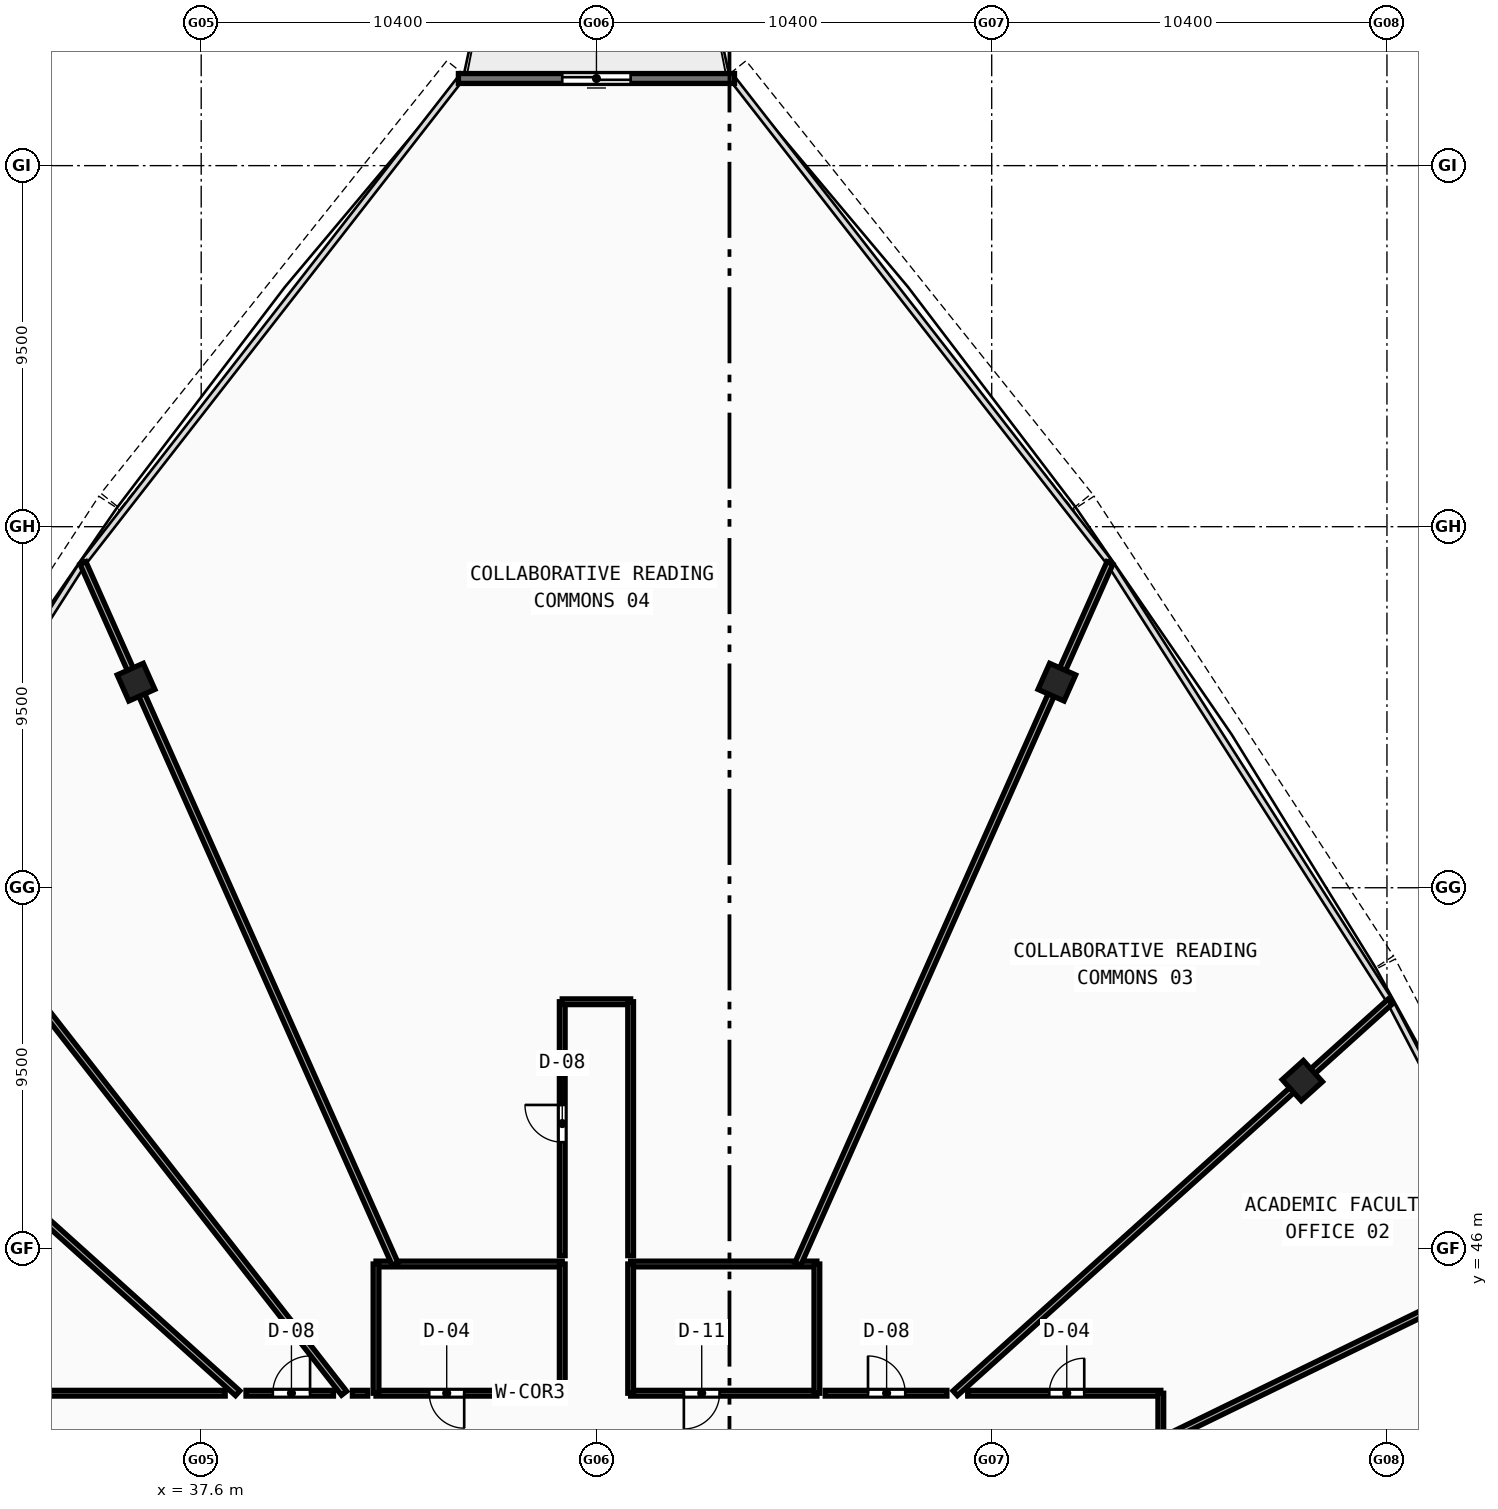
"""IFC4 building model, lengths in metres.
Left out: names, types, materials, properties, quantities, classifications, styles, units other than length and angle.
Written with IfcOpenShell. Run it as: python <this file> out.ifc"""

import sys

from ifc_helpers import new_model, si_unit, direction, frame, frame_2d, origin, origin_with_axes, origin_2d, place, context, subcontext, project, spatial, rectangle, hollow_rectangle, extrude, source, transform, mapped, element, fill, save


model = new_model("IFC4")
c1 = context("Model", 3, precision=1e-05, world=origin(), true_north=direction((0.0, 1.0)))
c2 = subcontext(c1, "Body", "Model", "MODEL_VIEW")
j1 = project(units=[si_unit("LENGTHUNIT", "METRE"), si_unit("PLANEANGLEUNIT", "RADIAN")], contexts=[c1])
p1 = place(None, origin())
s1 = spatial("IfcSite", under=j1, at=p1, CompositionType="ELEMENT")
p2 = place(p1, origin())
s2 = spatial("IfcBuilding", under=s1, at=p2, CompositionType="ELEMENT")
p3 = place(p2, frame((0.0, 0.0, 277.56)))
s3 = spatial("IfcBuildingStorey", under=s2, at=p3, CompositionType="ELEMENT", Elevation=277.56)
m1 = source(origin(), c2, "Body", "SweptSolid", [
    extrude(hollow_rectangle(XDim=0.75, YDim=0.75, WallThickness=0.028, at=origin_2d()), origin(), (0.0, 0.0, 1.0), 3.73),
])
for number, where, z_axis, x_axis in (
    (1, (66.573, 50.424, -0.26), (0.0, 0.0, 1.0), (-0.669, 0.743, 0.0)),
    (2, (60.114, 60.909, -0.26), (0.0, 0.0, 1.0), (-0.914, 0.407, 0.0)),
    (3, (35.886, 60.909, -0.26), (0.0, 0.0, 1.0), (-0.914, -0.407, 0.0)),
):
    element("IfcColumn", number, at=place(p3, frame(where, z_axis=z_axis, x_axis=x_axis)), inside=s3, PredefinedType="COLUMN", context=c2, shape_type="MappedRepresentation", body=[
        mapped(m1, transform((0.0, 0.0, 0.0), scale=1.0)),
    ])
p4 = place(p3, frame((51.632, 76.793, 0.0), z_axis=(0.0, 0.0, 1.0), x_axis=(-1.0, 0.0, 0.0)))
e4 = element("IfcWall", 4, at=p4, inside=s3, PredefinedType="STANDARD", context=c2, shape_type="SweptSolid", body=[
    extrude(rectangle(XDim=7.264, YDim=0.26, at=frame_2d((3.632, 0.0))), origin(), (0.0, 0.0, 1.0), 3.47),
])
p5 = place(p4, frame((2.732, 0.0, 0.0)))
e5 = element("IfcOpeningElement", 5, at=p5, cuts=e4, PredefinedType="OPENING", context=c2, shape_type="SweptSolid", body=[
    extrude(rectangle(XDim=1.8, YDim=2.15, at=frame_2d((0.9, 1.075))), frame((0.0, 0.14, 0.0), z_axis=(0.0, -1.0, 0.0), x_axis=(1.0, 0.0, 0.0)), (0.0, 0.0, 1.0), 0.28),
])
p6 = place(p3, frame((42.2, 42.2, 0.0), z_axis=(0.0, 0.0, 1.0), x_axis=(1.0, 0.0, 0.0)))
e6 = element("IfcWall", 6, at=p6, inside=s3, PredefinedType="PARTITIONING", context=c2, shape_type="SweptSolid", body=[
    extrude(rectangle(XDim=4.9, YDim=0.15, at=frame_2d((2.45, 0.0))), origin(), (0.0, 0.0, 1.0), 2.87),
])
p7 = place(p6, frame((1.4, 0.0, 0.0)))
e7 = element("IfcOpeningElement", 7, at=p7, cuts=e6, PredefinedType="OPENING", context=c2, shape_type="SweptSolid", body=[
    extrude(rectangle(XDim=0.92, YDim=2.1, at=frame_2d((0.46, 1.05))), frame((0.0, 0.085, 0.0), z_axis=(0.0, -1.0, 0.0), x_axis=(1.0, 0.0, 0.0)), (0.0, 0.0, 1.0), 0.17),
])
p8 = place(p3, frame((42.2, 45.6, 0.0), z_axis=(0.0, 0.0, 1.0), x_axis=(1.0, 0.0, 0.0)))
e8 = element("IfcWall", 8, at=p8, inside=s3, PredefinedType="PARTITIONING", context=c2, shape_type="SweptSolid", body=[
    extrude(rectangle(XDim=4.9, YDim=0.15, at=frame_2d((2.45, 0.0))), origin(), (0.0, 0.0, 1.0), 2.87),
])
for number, where, z_axis, x_axis in (
    (9, (42.2, 42.2, 0.0), (0.0, 0.0, 1.0), (0.0, 1.0, 0.0)),
    (10, (47.1, 42.2, 0.0), (0.0, 0.0, 1.0), (0.0, 1.0, 0.0)),
):
    element("IfcWall", number, at=place(p3, frame(where, z_axis=z_axis, x_axis=x_axis)), inside=s3, PredefinedType="PARTITIONING", context=c2, shape_type="SweptSolid", body=[
        extrude(rectangle(XDim=3.4, YDim=0.15, at=frame_2d((1.7, 0.0))), origin(), (0.0, 0.0, 1.0), 3.47),
    ])
p9 = place(p3, frame((48.9, 42.2, 0.0), z_axis=(0.0, 0.0, 1.0), x_axis=(1.0, 0.0, 0.0)))
e11 = element("IfcWall", 11, at=p9, inside=s3, PredefinedType="PARTITIONING", context=c2, shape_type="SweptSolid", body=[
    extrude(rectangle(XDim=4.9, YDim=0.15, at=frame_2d((2.45, 0.0))), origin(), (0.0, 0.0, 1.0), 2.87),
])
p10 = place(p9, frame((1.4, 0.0, 0.0)))
e12 = element("IfcOpeningElement", 12, at=p10, cuts=e11, PredefinedType="OPENING", context=c2, shape_type="SweptSolid", body=[
    extrude(rectangle(XDim=0.94, YDim=2.1, at=frame_2d((0.47, 1.05))), frame((0.0, 0.085, 0.0), z_axis=(0.0, -1.0, 0.0), x_axis=(1.0, 0.0, 0.0)), (0.0, 0.0, 1.0), 0.17),
])
p11 = place(p3, frame((48.9, 45.6, 0.0), z_axis=(0.0, 0.0, 1.0), x_axis=(1.0, 0.0, 0.0)))
e13 = element("IfcWall", 13, at=p11, inside=s3, PredefinedType="PARTITIONING", context=c2, shape_type="SweptSolid", body=[
    extrude(rectangle(XDim=4.9, YDim=0.15, at=frame_2d((2.45, 0.0))), origin(), (0.0, 0.0, 1.0), 2.87),
])
for number, where, z_axis, x_axis in (
    (14, (48.9, 42.2, 0.0), (0.0, 0.0, 1.0), (0.0, 1.0, 0.0)),
    (15, (53.8, 42.2, 0.0), (0.0, 0.0, 1.0), (0.0, 1.0, 0.0)),
):
    element("IfcWall", number, at=place(p3, frame(where, z_axis=z_axis, x_axis=x_axis)), inside=s3, PredefinedType="PARTITIONING", context=c2, shape_type="SweptSolid", body=[
        extrude(rectangle(XDim=3.4, YDim=0.15, at=frame_2d((1.7, 0.0))), origin(), (0.0, 0.0, 1.0), 3.47),
    ])
p12 = place(p3, frame((62.85, 38.525, 0.0), z_axis=(0.0, 0.0, 1.0), x_axis=(0.951059664494, 0.309007305047, 0.0)))
e16 = element("IfcWall", 16, at=p12, inside=s3, PredefinedType="PARTITIONING", context=c2, shape_type="SweptSolid", body=[
    extrude(rectangle(XDim=11.985, YDim=0.17, at=frame_2d((5.992, 0.0))), origin(), (0.0, 0.0, 1.0), 2.87),
])
p13 = place(p3, frame((62.85, 40.943, 0.0), z_axis=(0.0, 0.0, 1.0), x_axis=(0.89879540995, 0.43836835088, 0.0)))
e17 = element("IfcWall", 17, at=p13, inside=s3, PredefinedType="PARTITIONING", context=c2, shape_type="SweptSolid", body=[
    extrude(rectangle(XDim=10.703, YDim=0.17, at=frame_2d((5.351, 0.0))), origin(), (0.0, 0.0, 1.0), 2.87),
])
p14 = place(p3, frame((57.44, 42.2, 0.0), z_axis=(0.0, 0.0, 1.0), x_axis=(0.743145118403, 0.669130281032, 0.0)))
e18 = element("IfcWall", 18, at=p14, inside=s3, PredefinedType="PARTITIONING", context=c2, shape_type="SweptSolid", body=[
    extrude(rectangle(XDim=15.397, YDim=0.17, at=frame_2d((7.699, 0.0))), origin(), (0.0, 0.0, 1.0), 2.87),
])
for number, where, z_axis, x_axis in (
    (19, (53.298, 45.6, 0.0), (0.0, 0.0, 1.0), (0.407, 0.914, 0.0)),
    (20, (42.702, 45.6, 0.0), (0.0, 0.0, 1.0), (-0.407, 0.914, 0.0)),
):
    element("IfcWall", number, at=place(p3, frame(where, z_axis=z_axis, x_axis=x_axis)), inside=s3, PredefinedType="PARTITIONING", context=c2, shape_type="SweptSolid", body=[
        extrude(rectangle(XDim=20.191, YDim=0.17, at=frame_2d((10.096, 0.0))), origin(), (0.0, 0.0, 1.0), 2.87),
    ])
p15 = place(p3, frame((41.359, 42.2, 0.0), z_axis=(0.0, 0.0, 1.0), x_axis=(-0.615658553978, 0.788013036005, 0.0)))
e21 = element("IfcWall", 21, at=p15, inside=s3, PredefinedType="PARTITIONING", context=c2, shape_type="SweptSolid", body=[
    extrude(rectangle(XDim=18.609, YDim=0.17, at=frame_2d((9.304, 0.0))), origin(), (0.0, 0.0, 1.0), 2.87),
])
p16 = place(p3, frame((38.56, 42.2, 0.0), z_axis=(0.0, 0.0, 1.0), x_axis=(-0.743145118403, 0.669130281032, 0.0)))
e22 = element("IfcWall", 22, at=p16, inside=s3, PredefinedType="PARTITIONING", context=c2, shape_type="SweptSolid", body=[
    extrude(rectangle(XDim=15.397, YDim=0.17, at=frame_2d((7.699, 0.0))), origin(), (0.0, 0.0, 1.0), 2.87),
])
p17 = place(p3, frame((33.15, 42.2, 0.0), z_axis=(0.0, 0.0, 1.0), x_axis=(1.0, 0.0, 0.0)))
e23 = element("IfcWall", 23, at=p17, inside=s3, PredefinedType="PARTITIONING", context=c2, shape_type="SweptSolid", body=[
    extrude(rectangle(XDim=5.081, YDim=0.15, at=frame_2d((2.541, 0.0))), origin(), (0.0, 0.0, 1.0), 3.12),
])
p18 = place(p3, frame((38.78, 42.2, 0.0), z_axis=(0.0, 0.0, 1.0), x_axis=(1.0, 0.0, 0.0)))
e24 = element("IfcWall", 24, at=p18, inside=s3, PredefinedType="PARTITIONING", context=c2, shape_type="SweptSolid", body=[
    extrude(rectangle(XDim=2.3, YDim=0.15, at=frame_2d((1.15, 0.0))), origin(), (0.0, 0.0, 1.0), 2.87),
])
p19 = place(p18, frame((0.705, 0.0, 0.0)))
e25 = element("IfcOpeningElement", 25, at=p19, cuts=e24, PredefinedType="OPENING", context=c2, shape_type="SweptSolid", body=[
    extrude(rectangle(XDim=0.98, YDim=2.12, at=frame_2d((0.49, 1.06))), frame((0.0, 0.085, 0.0), z_axis=(0.0, -1.0, 0.0), x_axis=(1.0, 0.0, 0.0)), (0.0, 0.0, 1.0), 0.17),
])
p20 = place(p3, frame((41.579, 42.2, 0.0), z_axis=(0.0, 0.0, 1.0), x_axis=(1.0, 0.0, 0.0)))
e26 = element("IfcWall", 26, at=p20, inside=s3, PredefinedType="PARTITIONING", context=c2, shape_type="SweptSolid", body=[
    extrude(rectangle(XDim=0.401, YDim=0.15, at=frame_2d((0.201, 0.0))), origin(), (0.0, 0.0, 1.0), 3.47),
])
p21 = place(p3, frame((47.1, 45.82, 0.0), z_axis=(0.0, 0.0, 1.0), x_axis=(0.0, 1.0, 0.0)))
e27 = element("IfcWall", 27, at=p21, inside=s3, PredefinedType="PARTITIONING", context=c2, shape_type="SweptSolid", body=[
    extrude(rectangle(XDim=6.68, YDim=0.15, at=frame_2d((3.34, 0.0))), origin(), (0.0, 0.0, 1.0), 3.12),
])
p22 = place(p21, frame((2.985, 0.0, 0.0)))
e28 = element("IfcOpeningElement", 28, at=p22, cuts=e27, PredefinedType="OPENING", context=c2, shape_type="SweptSolid", body=[
    extrude(rectangle(XDim=0.98, YDim=2.12, at=frame_2d((0.49, 1.06))), frame((0.0, 0.085, 0.0), z_axis=(0.0, -1.0, 0.0), x_axis=(1.0, 0.0, 0.0)), (0.0, 0.0, 1.0), 0.17),
])
p23 = place(p3, frame((47.1, 52.5, 0.0), z_axis=(0.0, 0.0, 1.0), x_axis=(1.0, 0.0, 0.0)))
e29 = element("IfcWall", 29, at=p23, inside=s3, PredefinedType="PARTITIONING", context=c2, shape_type="SweptSolid", body=[
    extrude(rectangle(XDim=1.8, YDim=0.15, at=frame_2d((0.9, 0.0))), origin(), (0.0, 0.0, 1.0), 3.47),
])
p24 = place(p3, frame((48.9, 52.5, 0.0), z_axis=(0.0, 0.0, 1.0), x_axis=(0.0, -1.0, 0.0)))
e30 = element("IfcWall", 30, at=p24, inside=s3, PredefinedType="PARTITIONING", context=c2, shape_type="SweptSolid", body=[
    extrude(rectangle(XDim=6.68, YDim=0.15, at=frame_2d((3.34, 0.0))), origin(), (0.0, 0.0, 1.0), 3.12),
])
p25 = place(p3, frame((54.02, 42.2, 0.0), z_axis=(0.0, 0.0, 1.0), x_axis=(1.0, 0.0, 0.0)))
e31 = element("IfcWall", 31, at=p25, inside=s3, PredefinedType="PARTITIONING", context=c2, shape_type="SweptSolid", body=[
    extrude(rectangle(XDim=3.2, YDim=0.15, at=frame_2d((1.6, 0.0))), origin(), (0.0, 0.0, 1.0), 2.87),
])
p26 = place(p25, frame((1.125, 0.0, 0.0)))
e32 = element("IfcOpeningElement", 32, at=p26, cuts=e31, PredefinedType="OPENING", context=c2, shape_type="SweptSolid", body=[
    extrude(rectangle(XDim=0.98, YDim=2.12, at=frame_2d((0.49, 1.06))), frame((0.0, 0.085, 0.0), z_axis=(0.0, -1.0, 0.0), x_axis=(1.0, 0.0, 0.0)), (0.0, 0.0, 1.0), 0.17),
])
p27 = place(p3, frame((57.769, 42.2, 0.0), z_axis=(0.0, 0.0, 1.0), x_axis=(1.0, 0.0, 0.0)))
e33 = element("IfcWall", 33, at=p27, inside=s3, PredefinedType="PARTITIONING", context=c2, shape_type="SweptSolid", body=[
    extrude(rectangle(XDim=5.081, YDim=0.15, at=frame_2d((2.541, 0.0))), origin(), (0.0, 0.0, 1.0), 3.12),
])
p28 = place(p27, frame((2.146, 0.0, 0.0)))
e34 = element("IfcOpeningElement", 34, at=p28, cuts=e33, PredefinedType="OPENING", context=c2, shape_type="SweptSolid", body=[
    extrude(rectangle(XDim=0.92, YDim=2.1, at=frame_2d((0.46, 1.05))), frame((0.0, 0.085, 0.0), z_axis=(0.0, -1.0, 0.0), x_axis=(1.0, 0.0, 0.0)), (0.0, 0.0, 1.0), 0.17),
])
p29 = place(p3, frame((62.85, 42.2, 0.0), z_axis=(0.0, 0.0, 1.0), x_axis=(0.0, -1.0, 0.0)))
e35 = element("IfcWall", 35, at=p29, inside=s3, PredefinedType="PARTITIONING", context=c2, shape_type="SweptSolid", body=[
    extrude(rectangle(XDim=1.012, YDim=0.15, at=frame_2d((0.506, 0.0))), origin(), (0.0, 0.0, 1.0), 3.47),
])
m2 = source(origin(), c2, "Body", "SweptSolid", [
    extrude(rectangle(XDim=1.8, YDim=2.15, at=frame_2d((0.9, 1.075))), frame((0.0, 0.025, 0.0), z_axis=(0.0, -1.0, 0.0), x_axis=(1.0, 0.0, 0.0)), (0.0, 0.0, 1.0), 0.05),
])
p30 = place(p5, origin_with_axes())
e36 = element("IfcDoor", 36, at=p30, inside=s3, OperationType="DOUBLE_DOOR_SLIDING", PredefinedType="DOOR", context=c2, shape_type="MappedRepresentation", body=[
    mapped(m2, transform((0.0, 0.0, 0.0), scale=1.0)),
])
fill(e5, e36)
m3 = source(origin(), c2, "Body", "SweptSolid", [
    extrude(rectangle(XDim=0.92, YDim=2.1, at=frame_2d((0.46, 1.05))), frame((0.0, 0.025, 0.0), z_axis=(0.0, -1.0, 0.0), x_axis=(1.0, 0.0, 0.0)), (0.0, 0.0, 1.0), 0.05),
])
p31 = place(p7, frame((0.92, 0.0, 0.0), z_axis=(0.0, 0.0, 1.0), x_axis=(-1.0, 0.0, 0.0)))
e37 = element("IfcDoor", 37, at=p31, inside=s3, OperationType="SINGLE_SWING_LEFT", PredefinedType="DOOR", context=c2, shape_type="MappedRepresentation", body=[
    mapped(m3, transform((0.0, 0.0, 0.0), scale=1.0)),
])
fill(e7, e37)
m4 = source(origin(), c2, "Body", "SweptSolid", [
    extrude(rectangle(XDim=0.94, YDim=2.1, at=frame_2d((0.47, 1.05))), frame((0.0, 0.025, 0.0), z_axis=(0.0, -1.0, 0.0), x_axis=(1.0, 0.0, 0.0)), (0.0, 0.0, 1.0), 0.05),
])
p32 = place(p10, frame((0.94, 0.0, 0.0), z_axis=(0.0, 0.0, 1.0), x_axis=(-1.0, 0.0, 0.0)))
e38 = element("IfcDoor", 38, at=p32, inside=s3, OperationType="SINGLE_SWING_RIGHT", PredefinedType="DOOR", context=c2, shape_type="MappedRepresentation", body=[
    mapped(m4, transform((0.0, 0.0, 0.0), scale=1.0)),
])
fill(e12, e38)
p33 = place(p28, origin_with_axes())
e39 = element("IfcDoor", 39, at=p33, inside=s3, OperationType="SINGLE_SWING_RIGHT", PredefinedType="DOOR", context=c2, shape_type="MappedRepresentation", body=[
    mapped(m3, transform((0.0, 0.0, 0.0), scale=1.0)),
])
fill(e34, e39)
m5 = source(origin(), c2, "Body", "SweptSolid", [
    extrude(rectangle(XDim=0.98, YDim=2.12, at=frame_2d((0.49, 1.06))), frame((0.0, 0.025, 0.0), z_axis=(0.0, -1.0, 0.0), x_axis=(1.0, 0.0, 0.0)), (0.0, 0.0, 1.0), 0.05),
])
p34 = place(p26, origin_with_axes())
e40 = element("IfcDoor", 40, at=p34, inside=s3, OperationType="SINGLE_SWING_LEFT", PredefinedType="DOOR", context=c2, shape_type="MappedRepresentation", body=[
    mapped(m5, transform((0.0, 0.0, 0.0), scale=1.0)),
])
fill(e32, e40)
p35 = place(p22, origin_with_axes())
e41 = element("IfcDoor", 41, at=p35, inside=s3, OperationType="SINGLE_SWING_RIGHT", PredefinedType="DOOR", context=c2, shape_type="MappedRepresentation", body=[
    mapped(m5, transform((0.0, 0.0, 0.0), scale=1.0)),
])
fill(e28, e41)
p36 = place(p19, origin_with_axes())
e42 = element("IfcDoor", 42, at=p36, inside=s3, OperationType="SINGLE_SWING_RIGHT", PredefinedType="DOOR", context=c2, shape_type="MappedRepresentation", body=[
    mapped(m5, transform((0.0, 0.0, 0.0), scale=1.0)),
])
fill(e25, e42)
save(model, sys.argv[1])
